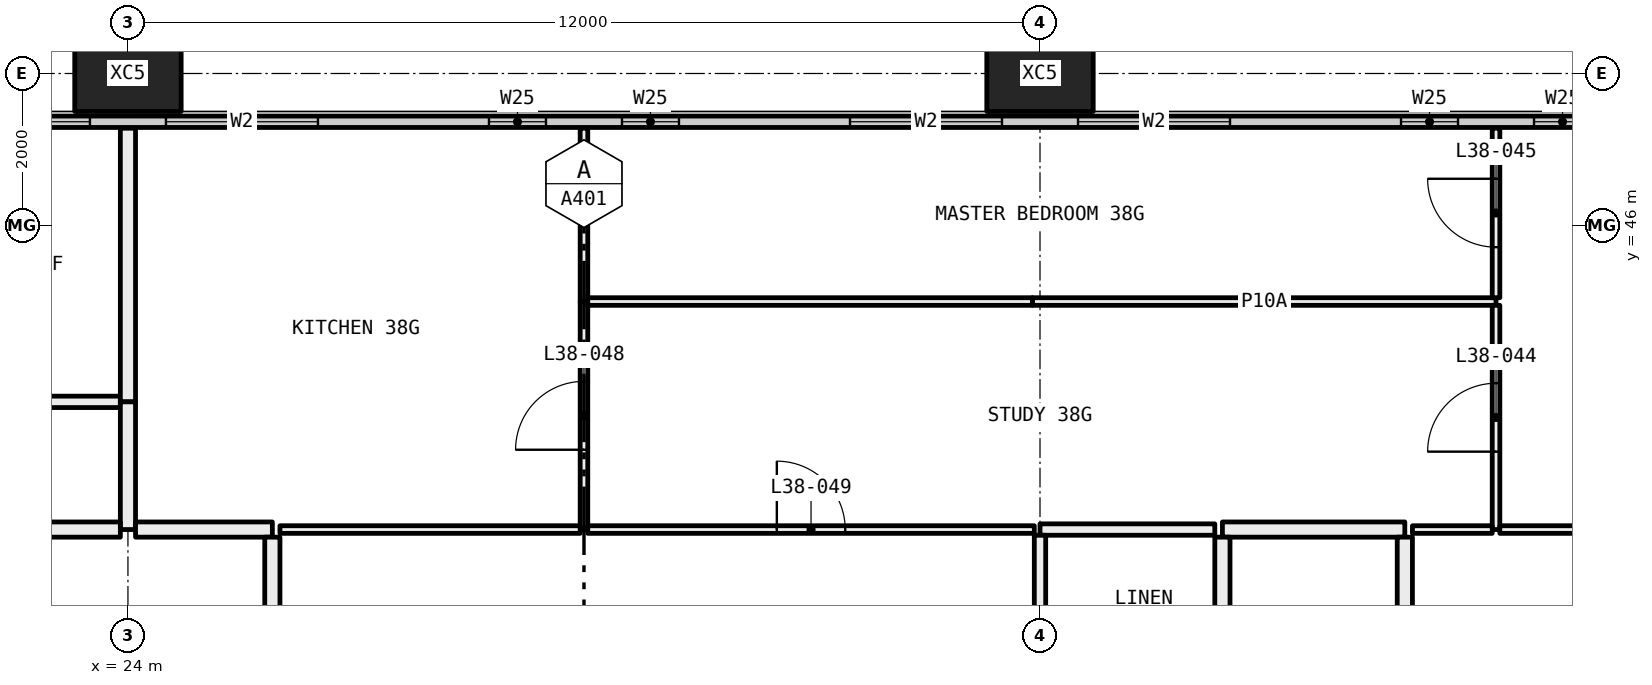
"""IFC4 building model, lengths in metres.
Left out: names, types, materials, properties, quantities, classifications, styles, units other than length and angle.
Written with IfcOpenShell. Run it as: python <this file> out.ifc"""

import sys

from ifc_helpers import new_model, si_unit, direction, frame, frame_2d, origin, origin_2d, place, context, subcontext, project, spatial, rectangle, hollow_rectangle, extrude, element, fill, save


model = new_model("IFC4")
c1 = context("Model", 3, precision=1e-05, world=origin(), true_north=direction((0.0, 1.0)))
c2 = subcontext(c1, "Body", "Model", "MODEL_VIEW")
j1 = project(units=[si_unit("LENGTHUNIT", "METRE"), si_unit("PLANEANGLEUNIT", "RADIAN")], contexts=[c1])
p1 = place(None, origin())
s1 = spatial("IfcSite", under=j1, at=p1, CompositionType="ELEMENT")
p2 = place(p1, origin())
s2 = spatial("IfcBuilding", under=s1, at=p2, CompositionType="ELEMENT")
p3 = place(p2, frame((0.0, 0.0, 144.9)))
s3 = spatial("IfcBuildingStorey", under=s2, at=p3, CompositionType="ELEMENT", Elevation=144.9)
for number, where, z_axis, x_axis in (
    (1, (24.0, 48.0, -0.4), (0.0, 0.0, 1.0), (1.0, 0.0, 0.0)),
    (2, (36.0, 48.0, -0.4), (0.0, 0.0, 1.0), (1.0, 0.0, 0.0)),
):
    element("IfcColumn", number, at=place(p3, frame(where, z_axis=z_axis, x_axis=x_axis)), inside=s3, PredefinedType="COLUMN", context=c2, shape_type="SweptSolid", body=[
        extrude(hollow_rectangle(XDim=1.4, YDim=1.0, WallThickness=0.055, at=origin_2d()), origin(), (0.0, 0.0, 1.0), 3.45),
    ])
p4 = place(p3, frame((6.56, 47.365, 0.0), z_axis=(0.0, 0.0, 1.0), x_axis=(1.0, 0.0, 0.0)))
e3 = element("IfcWall", 3, at=p4, inside=s3, PredefinedType="ELEMENTEDWALL", context=c2, shape_type="SweptSolid", body=[
    extrude(rectangle(XDim=58.88, YDim=0.15, at=frame_2d((29.44, 0.0))), origin(), (0.0, 0.0, 1.0), 3.05),
])
p5 = place(p4, frame((0.44, 0.0, 0.45)))
e4 = element("IfcOpeningElement", 4, at=p5, cuts=e3, PredefinedType="OPENING", context=c2, shape_type="SweptSolid", body=[
    extrude(rectangle(XDim=4.5, YDim=2.55, at=frame_2d((2.25, 1.275))), frame((0.0, 0.085, 0.0), z_axis=(0.0, -1.0, 0.0), x_axis=(1.0, 0.0, 0.0)), (0.0, 0.0, 1.0), 0.17),
])
p6 = place(p4, frame((5.94, 0.0, 0.45)))
e5 = element("IfcOpeningElement", 5, at=p6, cuts=e3, PredefinedType="OPENING", context=c2, shape_type="SweptSolid", body=[
    extrude(rectangle(XDim=2.0, YDim=2.55, at=frame_2d((1.0, 1.275))), frame((0.0, 0.085, 0.0), z_axis=(0.0, -1.0, 0.0), x_axis=(1.0, 0.0, 0.0)), (0.0, 0.0, 1.0), 0.17),
])
p7 = place(p4, frame((10.19, 0.0, 0.45)))
e6 = element("IfcOpeningElement", 6, at=p7, cuts=e3, PredefinedType="OPENING", context=c2, shape_type="SweptSolid", body=[
    extrude(rectangle(XDim=0.75, YDim=2.55, at=frame_2d((0.375, 1.275))), frame((0.0, 0.085, 0.0), z_axis=(0.0, -1.0, 0.0), x_axis=(1.0, 0.0, 0.0)), (0.0, 0.0, 1.0), 0.17),
])
p8 = place(p4, frame((11.94, 0.0, 0.45)))
e7 = element("IfcOpeningElement", 7, at=p8, cuts=e3, PredefinedType="OPENING", context=c2, shape_type="SweptSolid", body=[
    extrude(rectangle(XDim=0.75, YDim=2.55, at=frame_2d((0.375, 1.275))), frame((0.0, 0.085, 0.0), z_axis=(0.0, -1.0, 0.0), x_axis=(1.0, 0.0, 0.0)), (0.0, 0.0, 1.0), 0.17),
])
p9 = place(p4, frame((14.94, 0.0, 0.45)))
e8 = element("IfcOpeningElement", 8, at=p9, cuts=e3, PredefinedType="OPENING", context=c2, shape_type="SweptSolid", body=[
    extrude(rectangle(XDim=2.0, YDim=2.55, at=frame_2d((1.0, 1.275))), frame((0.0, 0.085, 0.0), z_axis=(0.0, -1.0, 0.0), x_axis=(1.0, 0.0, 0.0)), (0.0, 0.0, 1.0), 0.17),
])
p10 = place(p4, frame((17.94, 0.0, 0.45)))
e9 = element("IfcOpeningElement", 9, at=p10, cuts=e3, PredefinedType="OPENING", context=c2, shape_type="SweptSolid", body=[
    extrude(rectangle(XDim=2.0, YDim=2.55, at=frame_2d((1.0, 1.275))), frame((0.0, 0.085, 0.0), z_axis=(0.0, -1.0, 0.0), x_axis=(1.0, 0.0, 0.0)), (0.0, 0.0, 1.0), 0.17),
])
p11 = place(p4, frame((22.19, 0.0, 0.45)))
e10 = element("IfcOpeningElement", 10, at=p11, cuts=e3, PredefinedType="OPENING", context=c2, shape_type="SweptSolid", body=[
    extrude(rectangle(XDim=0.75, YDim=2.55, at=frame_2d((0.375, 1.275))), frame((0.0, 0.085, 0.0), z_axis=(0.0, -1.0, 0.0), x_axis=(1.0, 0.0, 0.0)), (0.0, 0.0, 1.0), 0.17),
])
p12 = place(p4, frame((23.94, 0.0, 0.45)))
e11 = element("IfcOpeningElement", 11, at=p12, cuts=e3, PredefinedType="OPENING", context=c2, shape_type="SweptSolid", body=[
    extrude(rectangle(XDim=0.75, YDim=2.55, at=frame_2d((0.375, 1.275))), frame((0.0, 0.085, 0.0), z_axis=(0.0, -1.0, 0.0), x_axis=(1.0, 0.0, 0.0)), (0.0, 0.0, 1.0), 0.17),
])
p13 = place(p4, frame((26.94, 0.0, 0.45)))
e12 = element("IfcOpeningElement", 12, at=p13, cuts=e3, PredefinedType="OPENING", context=c2, shape_type="SweptSolid", body=[
    extrude(rectangle(XDim=2.0, YDim=2.55, at=frame_2d((1.0, 1.275))), frame((0.0, 0.085, 0.0), z_axis=(0.0, -1.0, 0.0), x_axis=(1.0, 0.0, 0.0)), (0.0, 0.0, 1.0), 0.17),
])
p14 = place(p4, frame((29.94, 0.0, 0.45)))
e13 = element("IfcOpeningElement", 13, at=p14, cuts=e3, PredefinedType="OPENING", context=c2, shape_type="SweptSolid", body=[
    extrude(rectangle(XDim=2.0, YDim=2.55, at=frame_2d((1.0, 1.275))), frame((0.0, 0.085, 0.0), z_axis=(0.0, -1.0, 0.0), x_axis=(1.0, 0.0, 0.0)), (0.0, 0.0, 1.0), 0.17),
])
p15 = place(p4, frame((34.19, 0.0, 0.45)))
e14 = element("IfcOpeningElement", 14, at=p15, cuts=e3, PredefinedType="OPENING", context=c2, shape_type="SweptSolid", body=[
    extrude(rectangle(XDim=0.75, YDim=2.55, at=frame_2d((0.375, 1.275))), frame((0.0, 0.085, 0.0), z_axis=(0.0, -1.0, 0.0), x_axis=(1.0, 0.0, 0.0)), (0.0, 0.0, 1.0), 0.17),
])
p16 = place(p4, frame((35.94, 0.0, 0.45)))
e15 = element("IfcOpeningElement", 15, at=p16, cuts=e3, PredefinedType="OPENING", context=c2, shape_type="SweptSolid", body=[
    extrude(rectangle(XDim=0.75, YDim=2.55, at=frame_2d((0.375, 1.275))), frame((0.0, 0.085, 0.0), z_axis=(0.0, -1.0, 0.0), x_axis=(1.0, 0.0, 0.0)), (0.0, 0.0, 1.0), 0.17),
])
p17 = place(p4, frame((38.94, 0.0, 0.45)))
e16 = element("IfcOpeningElement", 16, at=p17, cuts=e3, PredefinedType="OPENING", context=c2, shape_type="SweptSolid", body=[
    extrude(rectangle(XDim=2.0, YDim=2.55, at=frame_2d((1.0, 1.275))), frame((0.0, 0.085, 0.0), z_axis=(0.0, -1.0, 0.0), x_axis=(1.0, 0.0, 0.0)), (0.0, 0.0, 1.0), 0.17),
])
p18 = place(p4, frame((41.94, 0.0, 0.45)))
e17 = element("IfcOpeningElement", 17, at=p18, cuts=e3, PredefinedType="OPENING", context=c2, shape_type="SweptSolid", body=[
    extrude(rectangle(XDim=2.0, YDim=2.55, at=frame_2d((1.0, 1.275))), frame((0.0, 0.085, 0.0), z_axis=(0.0, -1.0, 0.0), x_axis=(1.0, 0.0, 0.0)), (0.0, 0.0, 1.0), 0.17),
])
p19 = place(p4, frame((46.19, 0.0, 0.45)))
e18 = element("IfcOpeningElement", 18, at=p19, cuts=e3, PredefinedType="OPENING", context=c2, shape_type="SweptSolid", body=[
    extrude(rectangle(XDim=0.75, YDim=2.55, at=frame_2d((0.375, 1.275))), frame((0.0, 0.085, 0.0), z_axis=(0.0, -1.0, 0.0), x_axis=(1.0, 0.0, 0.0)), (0.0, 0.0, 1.0), 0.17),
])
p20 = place(p4, frame((47.94, 0.0, 0.45)))
e19 = element("IfcOpeningElement", 19, at=p20, cuts=e3, PredefinedType="OPENING", context=c2, shape_type="SweptSolid", body=[
    extrude(rectangle(XDim=0.75, YDim=2.55, at=frame_2d((0.375, 1.275))), frame((0.0, 0.085, 0.0), z_axis=(0.0, -1.0, 0.0), x_axis=(1.0, 0.0, 0.0)), (0.0, 0.0, 1.0), 0.17),
])
p21 = place(p4, frame((50.94, 0.0, 0.45)))
e20 = element("IfcOpeningElement", 20, at=p21, cuts=e3, PredefinedType="OPENING", context=c2, shape_type="SweptSolid", body=[
    extrude(rectangle(XDim=2.0, YDim=2.55, at=frame_2d((1.0, 1.275))), frame((0.0, 0.085, 0.0), z_axis=(0.0, -1.0, 0.0), x_axis=(1.0, 0.0, 0.0)), (0.0, 0.0, 1.0), 0.17),
])
p22 = place(p4, frame((53.94, 0.0, 0.45)))
e21 = element("IfcOpeningElement", 21, at=p22, cuts=e3, PredefinedType="OPENING", context=c2, shape_type="SweptSolid", body=[
    extrude(rectangle(XDim=4.5, YDim=2.55, at=frame_2d((2.25, 1.275))), frame((0.0, 0.085, 0.0), z_axis=(0.0, -1.0, 0.0), x_axis=(1.0, 0.0, 0.0)), (0.0, 0.0, 1.0), 0.17),
])
p23 = place(p3, frame((18.075, 43.68, 0.0), z_axis=(0.0, 0.0, 1.0), x_axis=(1.0, 0.0, 0.0)))
e22 = element("IfcWall", 22, at=p23, inside=s3, PredefinedType="PARTITIONING", context=c2, shape_type="SweptSolid", body=[
    extrude(rectangle(XDim=5.825, YDim=0.15, at=frame_2d((2.913, 0.0))), origin(), (0.0, 0.0, 1.0), 3.05),
])
p24 = place(p3, frame((24.0, 43.68, 0.0), z_axis=(0.0, 0.0, 1.0), x_axis=(0.0, 1.0, 0.0)))
e23 = element("IfcWall", 23, at=p24, inside=s3, PredefinedType="PARTITIONING", context=c2, shape_type="SweptSolid", body=[
    extrude(rectangle(XDim=3.6, YDim=0.2, at=frame_2d((1.8, 0.0))), origin(), (0.0, 0.0, 1.0), 3.05),
])
p25 = place(p3, frame((24.0, 42.0, 0.0), z_axis=(0.0, 0.0, 1.0), x_axis=(0.0, 1.0, 0.0)))
e24 = element("IfcWall", 24, at=p25, inside=s3, PredefinedType="PARTITIONING", context=c2, shape_type="SweptSolid", body=[
    extrude(rectangle(XDim=1.68, YDim=0.2, at=frame_2d((0.84, 0.0))), origin(), (0.0, 0.0, 1.0), 3.05),
])
p26 = place(p3, frame((18.0, 42.0, 0.0), z_axis=(0.0, 0.0, 1.0), x_axis=(1.0, 0.0, 0.0)))
e25 = element("IfcWall", 25, at=p26, inside=s3, PredefinedType="PARTITIONING", context=c2, shape_type="SweptSolid", body=[
    extrude(rectangle(XDim=5.9, YDim=0.2, at=frame_2d((2.95, 0.0))), origin(), (0.0, 0.0, 1.0), 3.05),
])
p27 = place(p3, frame((30.0, 42.0, 0.0), z_axis=(0.0, 0.0, 1.0), x_axis=(0.0, 1.0, 0.0)))
e26 = element("IfcWall", 26, at=p27, inside=s3, PredefinedType="PARTITIONING", context=c2, shape_type="SweptSolid", body=[
    extrude(rectangle(XDim=3.0, YDim=0.1, at=frame_2d((1.5, 0.0))), origin(), (0.0, 0.0, 1.0), 3.05),
])
p28 = place(p27, frame((1.05, 0.0, 0.0)))
e27 = element("IfcOpeningElement", 27, at=p28, cuts=e26, PredefinedType="OPENING", context=c2, shape_type="SweptSolid", body=[
    extrude(rectangle(XDim=0.9, YDim=2.1, at=frame_2d((0.45, 1.05))), frame((0.0, 0.06, 0.0), z_axis=(0.0, -1.0, 0.0), x_axis=(1.0, 0.0, 0.0)), (0.0, 0.0, 1.0), 0.12),
])
p29 = place(p3, frame((30.0, 45.0, 0.0), z_axis=(0.0, 0.0, 1.0), x_axis=(0.0, 1.0, 0.0)))
e28 = element("IfcWall", 28, at=p29, inside=s3, PredefinedType="PARTITIONING", context=c2, shape_type="SweptSolid", body=[
    extrude(rectangle(XDim=2.28, YDim=0.1, at=frame_2d((1.14, 0.0))), origin(), (0.0, 0.0, 1.0), 3.05),
])
p30 = place(p3, frame((26.0, 42.0, 0.0), z_axis=(0.0, 0.0, 1.0), x_axis=(1.0, 0.0, 0.0)))
e29 = element("IfcWall", 29, at=p30, inside=s3, PredefinedType="PARTITIONING", context=c2, shape_type="SweptSolid", body=[
    extrude(rectangle(XDim=3.95, YDim=0.1, at=frame_2d((1.975, 0.0))), origin(), (0.0, 0.0, 1.0), 3.05),
])
p31 = place(p3, frame((24.1, 42.0, 0.0), z_axis=(0.0, 0.0, 1.0), x_axis=(1.0, 0.0, 0.0)))
e30 = element("IfcWall", 30, at=p31, inside=s3, PredefinedType="PARTITIONING", context=c2, shape_type="SweptSolid", body=[
    extrude(rectangle(XDim=1.8, YDim=0.2, at=frame_2d((0.9, 0.0))), origin(), (0.0, 0.0, 1.0), 3.05),
])
p32 = place(p3, frame((42.0, 45.0, 0.0), z_axis=(0.0, 0.0, 1.0), x_axis=(-1.0, 0.0, 0.0)))
e31 = element("IfcWall", 31, at=p32, inside=s3, PredefinedType="PARTITIONING", context=c2, shape_type="SweptSolid", body=[
    extrude(rectangle(XDim=6.1, YDim=0.1, at=frame_2d((3.05, 0.0))), origin(), (0.0, 0.0, 1.0), 2.45),
])
p33 = place(p3, frame((35.9, 45.0, 0.0), z_axis=(0.0, 0.0, 1.0), x_axis=(-1.0, 0.0, 0.0)))
e32 = element("IfcWall", 32, at=p33, inside=s3, PredefinedType="PARTITIONING", context=c2, shape_type="SweptSolid", body=[
    extrude(rectangle(XDim=5.85, YDim=0.1, at=frame_2d((2.925, 0.0))), origin(), (0.0, 0.0, 1.0), 3.05),
])
p34 = place(p3, frame((42.0, 42.0, 0.0), z_axis=(0.0, 0.0, 1.0), x_axis=(0.0, 1.0, 0.0)))
e33 = element("IfcWall", 33, at=p34, inside=s3, PredefinedType="PARTITIONING", context=c2, shape_type="SweptSolid", body=[
    extrude(rectangle(XDim=2.95, YDim=0.1, at=frame_2d((1.475, 0.0))), origin(), (0.0, 0.0, 1.0), 3.05),
])
p35 = place(p34, frame((1.025, 0.0, 0.0)))
e34 = element("IfcOpeningElement", 34, at=p35, cuts=e33, PredefinedType="OPENING", context=c2, shape_type="SweptSolid", body=[
    extrude(rectangle(XDim=0.9, YDim=2.1, at=frame_2d((0.45, 1.05))), frame((0.0, 0.06, 0.0), z_axis=(0.0, -1.0, 0.0), x_axis=(1.0, 0.0, 0.0)), (0.0, 0.0, 1.0), 0.12),
])
p36 = place(p3, frame((30.05, 42.0, 0.0), z_axis=(0.0, 0.0, 1.0), x_axis=(1.0, 0.0, 0.0)))
e35 = element("IfcWall", 35, at=p36, inside=s3, PredefinedType="PARTITIONING", context=c2, shape_type="SweptSolid", body=[
    extrude(rectangle(XDim=5.875, YDim=0.1, at=frame_2d((2.938, 0.0))), origin(), (0.0, 0.0, 1.0), 2.45),
])
p37 = place(p36, frame((2.488, 0.0, 0.0)))
e36 = element("IfcOpeningElement", 36, at=p37, cuts=e35, PredefinedType="OPENING", context=c2, shape_type="SweptSolid", body=[
    extrude(rectangle(XDim=0.9, YDim=2.1, at=frame_2d((0.45, 1.05))), frame((0.0, 0.06, 0.0), z_axis=(0.0, -1.0, 0.0), x_axis=(1.0, 0.0, 0.0)), (0.0, 0.0, 1.0), 0.12),
])
p38 = place(p3, frame((36.0, 42.0, 0.0), z_axis=(0.0, 0.0, 1.0), x_axis=(1.0, 0.0, 0.0)))
e37 = element("IfcWall", 37, at=p38, inside=s3, PredefinedType="PARTITIONING", context=c2, shape_type="SweptSolid", body=[
    extrude(rectangle(XDim=2.3, YDim=0.15, at=frame_2d((1.15, 0.0))), origin(), (0.0, 0.0, 1.0), 2.45),
])
p39 = place(p3, frame((40.9, 42.0, 0.0), z_axis=(0.0, 0.0, 1.0), x_axis=(1.0, 0.0, 0.0)))
e38 = element("IfcWall", 38, at=p39, inside=s3, PredefinedType="PARTITIONING", context=c2, shape_type="SweptSolid", body=[
    extrude(rectangle(XDim=1.05, YDim=0.1, at=frame_2d((0.525, 0.0))), origin(), (0.0, 0.0, 1.0), 3.05),
])
p40 = place(p3, frame((38.4, 42.0, 0.0), z_axis=(0.0, 0.0, 1.0), x_axis=(1.0, 0.0, 0.0)))
e39 = element("IfcWall", 39, at=p40, inside=s3, PredefinedType="PARTITIONING", context=c2, shape_type="SweptSolid", body=[
    extrude(rectangle(XDim=2.4, YDim=0.2, at=frame_2d((1.2, 0.0))), origin(), (0.0, 0.0, 1.0), 3.05),
])
p41 = place(p3, frame((42.0, 45.05, 0.0), z_axis=(0.0, 0.0, 1.0), x_axis=(0.0, 1.0, 0.0)))
e40 = element("IfcWall", 40, at=p41, inside=s3, PredefinedType="PARTITIONING", context=c2, shape_type="SweptSolid", body=[
    extrude(rectangle(XDim=2.23, YDim=0.1, at=frame_2d((1.115, 0.0))), origin(), (0.0, 0.0, 1.0), 3.05),
])
p42 = place(p41, frame((0.665, 0.0, 0.0)))
e41 = element("IfcOpeningElement", 41, at=p42, cuts=e40, PredefinedType="OPENING", context=c2, shape_type="SweptSolid", body=[
    extrude(rectangle(XDim=0.9, YDim=2.1, at=frame_2d((0.45, 1.05))), frame((0.0, 0.06, 0.0), z_axis=(0.0, -1.0, 0.0), x_axis=(1.0, 0.0, 0.0)), (0.0, 0.0, 1.0), 0.12),
])
p43 = place(p3, frame((42.05, 42.0, 0.0), z_axis=(0.0, 0.0, 1.0), x_axis=(1.0, 0.0, 0.0)))
e42 = element("IfcWall", 42, at=p43, inside=s3, PredefinedType="PARTITIONING", context=c2, shape_type="SweptSolid", body=[
    extrude(rectangle(XDim=3.95, YDim=0.1, at=frame_2d((1.975, 0.0))), origin(), (0.0, 0.0, 1.0), 3.05),
])
p44 = place(p43, frame((1.525, 0.0, 0.0)))
e43 = element("IfcOpeningElement", 43, at=p44, cuts=e42, PredefinedType="OPENING", context=c2, shape_type="SweptSolid", body=[
    extrude(rectangle(XDim=0.9, YDim=2.1, at=frame_2d((0.45, 1.05))), frame((0.0, 0.06, 0.0), z_axis=(0.0, -1.0, 0.0), x_axis=(1.0, 0.0, 0.0)), (0.0, 0.0, 1.0), 0.12),
])
p45 = place(p3, frame((36.0, 37.95, 0.0), z_axis=(0.0, 0.0, 1.0), x_axis=(0.0, 1.0, 0.0)))
e44 = element("IfcWall", 44, at=p45, inside=s3, PredefinedType="PARTITIONING", context=c2, shape_type="SweptSolid", body=[
    extrude(rectangle(XDim=3.975, YDim=0.15, at=frame_2d((1.988, 0.0))), origin(), (0.0, 0.0, 1.0), 2.45),
])
p46 = place(p45, frame((1.538, 0.0, 0.0)))
e45 = element("IfcOpeningElement", 45, at=p46, cuts=e44, PredefinedType="OPENING", context=c2, shape_type="SweptSolid", body=[
    extrude(rectangle(XDim=0.9, YDim=2.1, at=frame_2d((0.45, 1.05))), frame((0.0, 0.085, 0.0), z_axis=(0.0, -1.0, 0.0), x_axis=(1.0, 0.0, 0.0)), (0.0, 0.0, 1.0), 0.17),
])
p47 = place(p3, frame((25.9, 41.9, 0.0), z_axis=(0.0, 0.0, 1.0), x_axis=(0.0, -1.0, 0.0)))
e46 = element("IfcWall", 46, at=p47, inside=s3, PredefinedType="PARTITIONING", context=c2, shape_type="SweptSolid", body=[
    extrude(rectangle(XDim=6.2, YDim=0.2, at=frame_2d((3.1, 0.0))), origin(), (0.0, 0.0, 1.0), 2.45),
])
p48 = place(p3, frame((38.4, 37.95, 0.0), z_axis=(0.0, 0.0, 1.0), x_axis=(0.0, 1.0, 0.0)))
e47 = element("IfcWall", 47, at=p48, inside=s3, PredefinedType="PARTITIONING", context=c2, shape_type="SweptSolid", body=[
    extrude(rectangle(XDim=3.95, YDim=0.2, at=frame_2d((1.975, 0.0))), origin(), (0.0, 0.0, 1.0), 3.05),
])
p49 = place(p3, frame((40.8, 41.9, 0.0), z_axis=(0.0, 0.0, 1.0), x_axis=(0.0, -1.0, 0.0)))
e48 = element("IfcWall", 48, at=p49, inside=s3, PredefinedType="PARTITIONING", context=c2, shape_type="SweptSolid", body=[
    extrude(rectangle(XDim=6.2, YDim=0.2, at=frame_2d((3.1, 0.0))), origin(), (0.0, 0.0, 1.0), 2.45),
])
p50 = place(p9, origin())
e49 = element("IfcWindow", 49, at=p50, inside=s3, PartitioningType="SINGLE_PANEL", PredefinedType="WINDOW", context=c2, shape_type="SweptSolid", body=[
    extrude(rectangle(XDim=2.0, YDim=2.55, at=frame_2d((1.0, 1.275))), frame((0.0, 0.03, 0.0), z_axis=(0.0, -1.0, 0.0), x_axis=(1.0, 0.0, 0.0)), (0.0, 0.0, 1.0), 0.06),
])
fill(e8, e49)
p51 = place(p10, origin())
e50 = element("IfcWindow", 50, at=p51, inside=s3, PartitioningType="SINGLE_PANEL", PredefinedType="WINDOW", context=c2, shape_type="SweptSolid", body=[
    extrude(rectangle(XDim=2.0, YDim=2.55, at=frame_2d((1.0, 1.275))), frame((0.0, 0.03, 0.0), z_axis=(0.0, -1.0, 0.0), x_axis=(1.0, 0.0, 0.0)), (0.0, 0.0, 1.0), 0.06),
])
fill(e9, e50)
p52 = place(p11, origin())
e51 = element("IfcWindow", 51, at=p52, inside=s3, PartitioningType="SINGLE_PANEL", PredefinedType="WINDOW", context=c2, shape_type="SweptSolid", body=[
    extrude(rectangle(XDim=0.75, YDim=2.55, at=frame_2d((0.375, 1.275))), frame((0.0, 0.03, 0.0), z_axis=(0.0, -1.0, 0.0), x_axis=(1.0, 0.0, 0.0)), (0.0, 0.0, 1.0), 0.06),
])
fill(e10, e51)
p53 = place(p12, origin())
e52 = element("IfcWindow", 52, at=p53, inside=s3, PartitioningType="SINGLE_PANEL", PredefinedType="WINDOW", context=c2, shape_type="SweptSolid", body=[
    extrude(rectangle(XDim=0.75, YDim=2.55, at=frame_2d((0.375, 1.275))), frame((0.0, 0.03, 0.0), z_axis=(0.0, -1.0, 0.0), x_axis=(1.0, 0.0, 0.0)), (0.0, 0.0, 1.0), 0.06),
])
fill(e11, e52)
p54 = place(p13, origin())
e53 = element("IfcWindow", 53, at=p54, inside=s3, PartitioningType="SINGLE_PANEL", PredefinedType="WINDOW", context=c2, shape_type="SweptSolid", body=[
    extrude(rectangle(XDim=2.0, YDim=2.55, at=frame_2d((1.0, 1.275))), frame((0.0, 0.03, 0.0), z_axis=(0.0, -1.0, 0.0), x_axis=(1.0, 0.0, 0.0)), (0.0, 0.0, 1.0), 0.06),
])
fill(e12, e53)
p55 = place(p14, origin())
e54 = element("IfcWindow", 54, at=p55, inside=s3, PartitioningType="SINGLE_PANEL", PredefinedType="WINDOW", context=c2, shape_type="SweptSolid", body=[
    extrude(rectangle(XDim=2.0, YDim=2.55, at=frame_2d((1.0, 1.275))), frame((0.0, 0.03, 0.0), z_axis=(0.0, -1.0, 0.0), x_axis=(1.0, 0.0, 0.0)), (0.0, 0.0, 1.0), 0.06),
])
fill(e13, e54)
p56 = place(p15, origin())
e55 = element("IfcWindow", 55, at=p56, inside=s3, PartitioningType="SINGLE_PANEL", PredefinedType="WINDOW", context=c2, shape_type="SweptSolid", body=[
    extrude(rectangle(XDim=0.75, YDim=2.55, at=frame_2d((0.375, 1.275))), frame((0.0, 0.03, 0.0), z_axis=(0.0, -1.0, 0.0), x_axis=(1.0, 0.0, 0.0)), (0.0, 0.0, 1.0), 0.06),
])
fill(e14, e55)
p57 = place(p16, origin())
e56 = element("IfcWindow", 56, at=p57, inside=s3, PartitioningType="SINGLE_PANEL", PredefinedType="WINDOW", context=c2, shape_type="SweptSolid", body=[
    extrude(rectangle(XDim=0.75, YDim=2.55, at=frame_2d((0.375, 1.275))), frame((0.0, 0.03, 0.0), z_axis=(0.0, -1.0, 0.0), x_axis=(1.0, 0.0, 0.0)), (0.0, 0.0, 1.0), 0.06),
])
fill(e15, e56)
p58 = place(p35, origin())
e57 = element("IfcDoor", 57, at=p58, inside=s3, OperationType="SINGLE_SWING_RIGHT", PredefinedType="DOOR", context=c2, shape_type="SweptSolid", body=[
    extrude(rectangle(XDim=0.9, YDim=2.1, at=frame_2d((0.45, 1.05))), frame((0.0, 0.025, 0.0), z_axis=(0.0, -1.0, 0.0), x_axis=(1.0, 0.0, 0.0)), (0.0, 0.0, 1.0), 0.05),
])
fill(e34, e57)
p59 = place(p42, origin())
e58 = element("IfcDoor", 58, at=p59, inside=s3, OperationType="SINGLE_SWING_LEFT", PredefinedType="DOOR", context=c2, shape_type="SweptSolid", body=[
    extrude(rectangle(XDim=0.9, YDim=2.1, at=frame_2d((0.45, 1.05))), frame((0.0, 0.025, 0.0), z_axis=(0.0, -1.0, 0.0), x_axis=(1.0, 0.0, 0.0)), (0.0, 0.0, 1.0), 0.05),
])
fill(e41, e58)
p60 = place(p28, origin())
e59 = element("IfcDoor", 59, at=p60, inside=s3, OperationType="SINGLE_SWING_RIGHT", PredefinedType="DOOR", context=c2, shape_type="SweptSolid", body=[
    extrude(rectangle(XDim=0.9, YDim=2.1, at=frame_2d((0.45, 1.05))), frame((0.0, 0.025, 0.0), z_axis=(0.0, -1.0, 0.0), x_axis=(1.0, 0.0, 0.0)), (0.0, 0.0, 1.0), 0.05),
])
fill(e27, e59)
p61 = place(p37, origin())
e60 = element("IfcDoor", 60, at=p61, inside=s3, OperationType="SINGLE_SWING_RIGHT", PredefinedType="DOOR", context=c2, shape_type="SweptSolid", body=[
    extrude(rectangle(XDim=0.9, YDim=2.1, at=frame_2d((0.45, 1.05))), frame((0.0, 0.025, 0.0), z_axis=(0.0, -1.0, 0.0), x_axis=(1.0, 0.0, 0.0)), (0.0, 0.0, 1.0), 0.05),
])
fill(e36, e60)
save(model, sys.argv[1])
